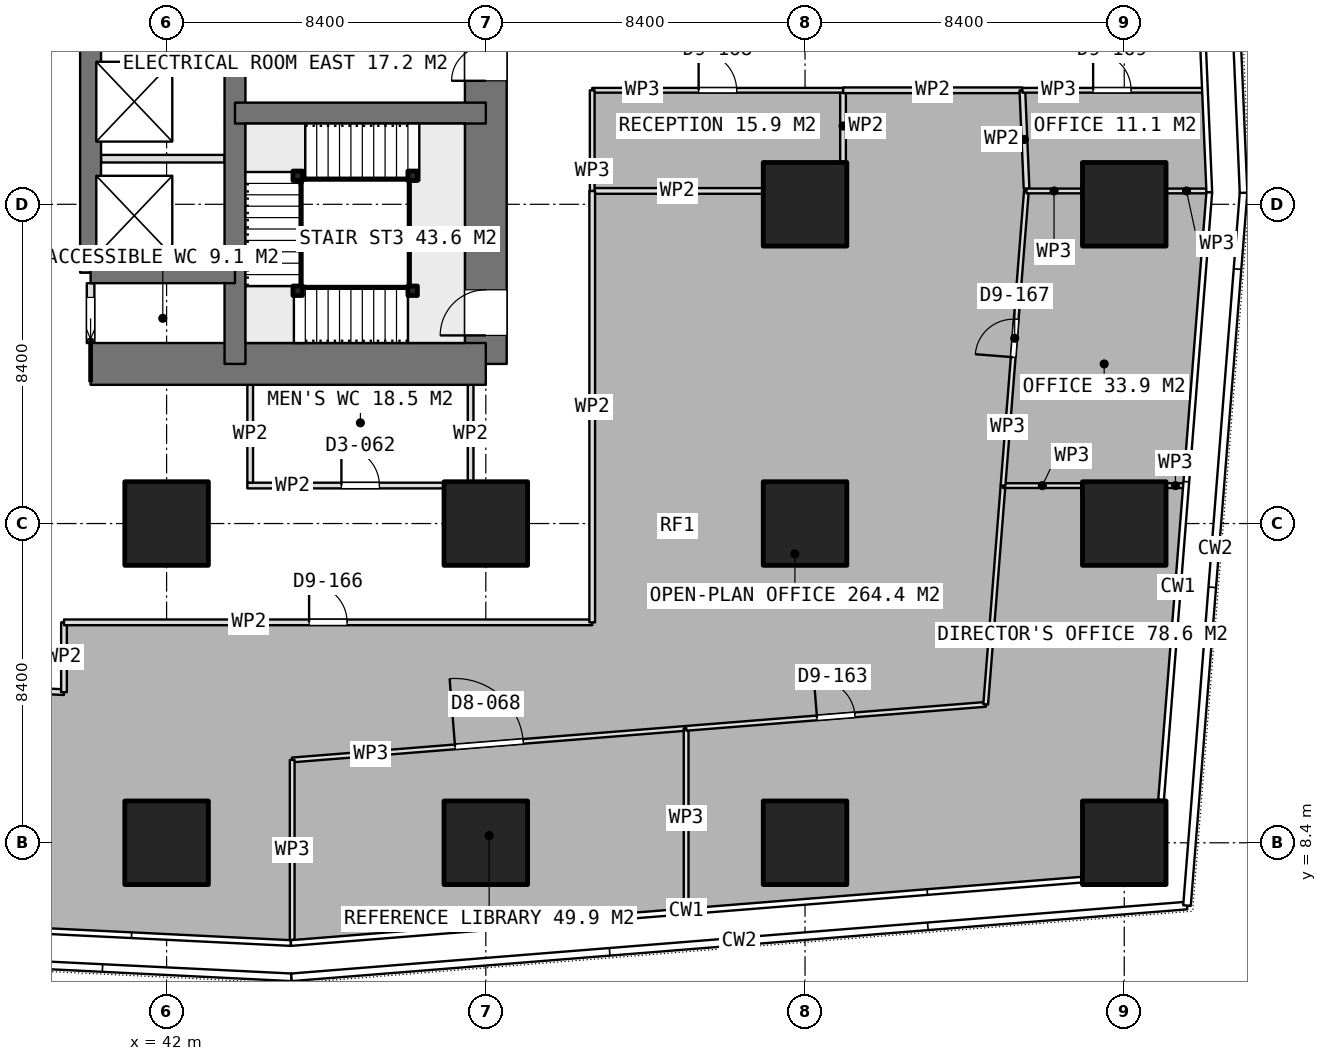
"""IFC4 building model, lengths in metres.
Left out: names, types, materials, properties, quantities, classifications, styles, units other than length and angle.
Written with IfcOpenShell. Run it as: python <this file> out.ifc"""

import sys

from ifc_helpers import new_model, si_unit, direction, frame, frame_2d, origin, origin_2d, place, context, subcontext, project, spatial, rectangle, extrude, element, fill, save


model = new_model("IFC4")
c1 = context("Model", 3, precision=1e-05, world=origin(), true_north=direction((0.0, 1.0)))
c2 = subcontext(c1, "Body", "Model", "MODEL_VIEW")
j1 = project(units=[si_unit("LENGTHUNIT", "METRE"), si_unit("PLANEANGLEUNIT", "RADIAN")], contexts=[c1])
p1 = place(None, origin())
s1 = spatial("IfcSite", under=j1, at=p1, CompositionType="ELEMENT")
p2 = place(p1, origin())
s2 = spatial("IfcBuilding", under=s1, at=p2, CompositionType="ELEMENT")
p3 = place(p2, frame((0.0, 0.0, 55.4)))
s3 = spatial("IfcBuildingStorey", under=s2, at=p3, CompositionType="ELEMENT", Elevation=55.4)
p4 = place(p3, frame((40.0, 21.0, 0.0), z_axis=(0.0, 0.0, 1.0), x_axis=(1.0, 0.0, 0.0)))
e1 = element("IfcWall", 1, at=p4, inside=s3, PredefinedType="SHEAR", context=c2, shape_type="SweptSolid", body=[
    extrude(rectangle(XDim=10.4, YDim=1.1, at=frame_2d((5.2, 0.0))), origin(), (0.0, 0.0, 1.0), 3.75),
])
p5 = place(p3, frame((50.4, 21.0, 0.0), z_axis=(0.0, 0.0, 1.0), x_axis=(0.0, 1.0, 0.0)))
e2 = element("IfcWall", 2, at=p5, inside=s3, PredefinedType="SHEAR", context=c2, shape_type="SweptSolid", body=[
    extrude(rectangle(XDim=25.2, YDim=1.1, at=frame_2d((12.6, 0.0))), origin(), (0.0, 0.0, 1.0), 3.75),
])
p6 = place(p5, frame((16.2, 0.0, 0.0)))
e3 = element("IfcOpeningElement", 3, at=p6, cuts=e2, PredefinedType="OPENING", context=c2, shape_type="SweptSolid", body=[
    extrude(rectangle(XDim=1.2, YDim=2.1, at=frame_2d((0.6, 1.05))), frame((0.0, 0.56, 0.0), z_axis=(0.0, -1.0, 0.0), x_axis=(1.0, 0.0, 0.0)), (0.0, 0.0, 1.0), 1.12),
])
p7 = place(p5, frame((10.05, 0.0, 0.0)))
e4 = element("IfcOpeningElement", 4, at=p7, cuts=e2, PredefinedType="OPENING", context=c2, shape_type="SweptSolid", body=[
    extrude(rectangle(XDim=0.9, YDim=2.1, at=frame_2d((0.45, 1.05))), frame((0.0, 0.56, 0.0), z_axis=(0.0, -1.0, 0.0), x_axis=(1.0, 0.0, 0.0)), (0.0, 0.0, 1.0), 1.12),
])
p8 = place(p5, frame((7.45, 0.0, 0.0)))
e5 = element("IfcOpeningElement", 5, at=p8, cuts=e2, PredefinedType="OPENING", context=c2, shape_type="SweptSolid", body=[
    extrude(rectangle(XDim=0.9, YDim=2.1, at=frame_2d((0.45, 1.05))), frame((0.0, 0.56, 0.0), z_axis=(0.0, -1.0, 0.0), x_axis=(1.0, 0.0, 0.0)), (0.0, 0.0, 1.0), 1.12),
])
p9 = place(p5, frame((0.75, 0.0, 0.0)))
e6 = element("IfcOpeningElement", 6, at=p9, cuts=e2, PredefinedType="OPENING", context=c2, shape_type="SweptSolid", body=[
    extrude(rectangle(XDim=1.2, YDim=2.1, at=frame_2d((0.6, 1.05))), frame((0.0, 0.56, 0.0), z_axis=(0.0, -1.0, 0.0), x_axis=(1.0, 0.0, 0.0)), (0.0, 0.0, 1.0), 1.12),
])
p10 = place(p3, frame((43.8, 21.0, 0.0), z_axis=(0.0, 0.0, 1.0), x_axis=(0.0, 1.0, 0.0)))
e7 = element("IfcWall", 7, at=p10, inside=s3, PredefinedType="SHEAR", context=c2, shape_type="SweptSolid", body=[
    extrude(rectangle(XDim=25.2, YDim=0.55, at=frame_2d((12.6, 0.0))), origin(), (0.0, 0.0, 1.0), 3.75),
])
p11 = place(p3, frame((40.0, 23.4, 0.0), z_axis=(0.0, 0.0, 1.0), x_axis=(0.0, 1.0, 0.0)))
e8 = element("IfcWall", 8, at=p11, inside=s3, PredefinedType="SHEAR", context=c2, shape_type="SweptSolid", body=[
    extrude(rectangle(XDim=18.0, YDim=0.55, at=frame_2d((9.0, 0.0))), origin(), (0.0, 0.0, 1.0), 3.75),
])
p12 = place(p3, frame((40.0, 23.4, 0.0), z_axis=(0.0, 0.0, 1.0), x_axis=(1.0, 0.0, 0.0)))
e9 = element("IfcWall", 9, at=p12, inside=s3, PredefinedType="SHEAR", context=c2, shape_type="SweptSolid", body=[
    extrude(rectangle(XDim=3.8, YDim=0.55, at=frame_2d((1.9, 0.0))), origin(), (0.0, 0.0, 1.0), 3.75),
])
p13 = place(p3, frame((43.8, 27.6, 0.0), z_axis=(0.0, 0.0, 1.0), x_axis=(1.0, 0.0, 0.0)))
e10 = element("IfcWall", 10, at=p13, inside=s3, PredefinedType="SHEAR", context=c2, shape_type="SweptSolid", body=[
    extrude(rectangle(XDim=6.6, YDim=0.55, at=frame_2d((3.3, 0.0))), origin(), (0.0, 0.0, 1.0), 3.75),
])
for number, where, z_axis, x_axis in (
    (11, (42.0, 8.4, 0.0), (0.0, 0.0, 1.0), (1.0, 0.0, 0.0)),
    (12, (42.0, 16.8, 0.0), (0.0, 0.0, 1.0), (1.0, 0.0, 0.0)),
    (13, (50.4, 8.4, 0.0), (0.0, 0.0, 1.0), (1.0, 0.0, 0.0)),
    (14, (50.4, 16.8, 0.0), (0.0, 0.0, 1.0), (1.0, 0.0, 0.0)),
    (15, (58.8, 8.4, 0.0), (0.0, 0.0, 1.0), (1.0, 0.0, 0.0)),
    (16, (58.8, 16.8, 0.0), (0.0, 0.0, 1.0), (1.0, 0.0, 0.0)),
    (17, (58.8, 25.2, 0.0), (0.0, 0.0, 1.0), (1.0, 0.0, 0.0)),
    (18, (67.2, 8.4, 0.0), (0.0, 0.0, 1.0), (1.0, 0.0, 0.0)),
    (19, (67.2, 16.8, 0.0), (0.0, 0.0, 1.0), (1.0, 0.0, 0.0)),
    (20, (67.2, 25.2, 0.0), (0.0, 0.0, 1.0), (1.0, 0.0, 0.0)),
):
    element("IfcColumn", number, at=place(p3, frame(where, z_axis=z_axis, x_axis=x_axis)), inside=s3, PredefinedType="COLUMN", context=c2, shape_type="SweptSolid", body=[
        extrude(rectangle(XDim=2.2, YDim=2.2, at=origin_2d()), origin(), (0.0, 0.0, 1.0), 3.75),
    ])
p14 = place(p3, frame((40.275, 26.4, 0.0), z_axis=(0.0, 0.0, 1.0), x_axis=(1.0, 0.0, 0.0)))
e21 = element("IfcWall", 21, at=p14, inside=s3, PredefinedType="PARTITIONING", context=c2, shape_type="SweptSolid", body=[
    extrude(rectangle(XDim=3.25, YDim=0.2, at=frame_2d((1.625, 0.0))), origin(), (0.0, 0.0, 1.0), 3.5),
])
p15 = place(p3, frame((40.0, 21.55, 0.0), z_axis=(0.0, 0.0, 1.0), x_axis=(0.0, 1.0, 0.0)))
e22 = element("IfcWall", 22, at=p15, inside=s3, PredefinedType="PARTITIONING", context=c2, shape_type="SweptSolid", body=[
    extrude(rectangle(XDim=1.575, YDim=0.2, at=frame_2d((0.788, 0.0))), origin(), (0.0, 0.0, 1.0), 3.5),
])
p16 = place(p15, frame((0.1, 0.0, 0.0)))
e23 = element("IfcOpeningElement", 23, at=p16, cuts=e22, PredefinedType="OPENING", context=c2, shape_type="SweptSolid", body=[
    extrude(rectangle(XDim=1.1, YDim=2.1, at=frame_2d((0.55, 1.05))), frame((0.0, 0.11, 0.0), z_axis=(0.0, -1.0, 0.0), x_axis=(1.0, 0.0, 0.0)), (0.0, 0.0, 1.0), 0.22),
])
p17 = place(p3, frame((44.125, 17.8, 0.0), z_axis=(0.0, 0.0, 1.0), x_axis=(1.0, 0.0, 0.0)))
e24 = element("IfcWall", 24, at=p17, inside=s3, PredefinedType="PARTITIONING", context=c2, shape_type="SweptSolid", body=[
    extrude(rectangle(XDim=5.95, YDim=0.15, at=frame_2d((2.975, 0.0))), origin(), (0.0, 0.0, 1.0), 3.5),
])
p18 = place(p17, frame((2.475, 0.0, 0.0)))
e25 = element("IfcOpeningElement", 25, at=p18, cuts=e24, PredefinedType="OPENING", context=c2, shape_type="SweptSolid", body=[
    extrude(rectangle(XDim=1.0, YDim=2.1, at=frame_2d((0.5, 1.05))), frame((0.0, 0.085, 0.0), z_axis=(0.0, -1.0, 0.0), x_axis=(1.0, 0.0, 0.0)), (0.0, 0.0, 1.0), 0.17),
])
for number, where, z_axis, x_axis in (
    (26, (44.2, 17.875, 0.0), (0.0, 0.0, 1.0), (0.0, 1.0, 0.0)),
    (27, (50.0, 17.875, 0.0), (0.0, 0.0, 1.0), (0.0, 1.0, 0.0)),
):
    element("IfcWall", number, at=place(p3, frame(where, z_axis=z_axis, x_axis=x_axis)), inside=s3, PredefinedType="PARTITIONING", context=c2, shape_type="SweptSolid", body=[
        extrude(rectangle(XDim=2.575, YDim=0.15, at=frame_2d((1.288, 0.0))), origin(), (0.0, 0.0, 1.0), 3.5),
    ])
p19 = place(p3, frame((45.305, 10.58, 0.0), z_axis=(0.0, 0.0, 1.0), x_axis=(0.996803548009, 0.079891718455, 0.0)))
e28 = element("IfcWall", 28, at=p19, inside=s3, PredefinedType="PARTITIONING", context=c2, shape_type="SweptSolid", body=[
    extrude(rectangle(XDim=10.399, YDim=0.125, at=frame_2d((5.2, 0.0))), origin(), (0.0, 0.0, 1.0), 3.5),
])
p20 = place(p19, frame((4.3, 0.0, 0.0)))
e29 = element("IfcOpeningElement", 29, at=p20, cuts=e28, PredefinedType="OPENING", context=c2, shape_type="SweptSolid", body=[
    extrude(rectangle(XDim=1.8, YDim=2.1, at=frame_2d((0.9, 1.05))), frame((0.0, 0.073, 0.0), z_axis=(0.0, -1.0, 0.0), x_axis=(1.0, 0.0, 0.0)), (0.0, 0.0, 1.0), 0.145),
])
p21 = place(p3, frame((55.671, 11.411, 0.0), z_axis=(0.0, 0.0, 1.0), x_axis=(0.0, -1.0, 0.0)))
e30 = element("IfcWall", 30, at=p21, inside=s3, PredefinedType="PARTITIONING", context=c2, shape_type="SweptSolid", body=[
    extrude(rectangle(XDim=4.736, YDim=0.125, at=frame_2d((2.368, 0.0))), origin(), (0.0, 0.0, 1.0), 3.5),
])
p22 = place(p3, frame((45.305, 5.845, 0.0), z_axis=(0.0, 0.0, 1.0), x_axis=(0.0, 1.0, 0.0)))
e31 = element("IfcWall", 31, at=p22, inside=s3, PredefinedType="PARTITIONING", context=c2, shape_type="SweptSolid", body=[
    extrude(rectangle(XDim=4.735, YDim=0.125, at=frame_2d((2.368, 0.0))), origin(), (0.0, 0.0, 1.0), 3.5),
])
p23 = place(p3, frame((55.673, 11.411, 0.0), z_axis=(0.0, 0.0, 1.0), x_axis=(0.996808893134, 0.079824999652, 0.0)))
e32 = element("IfcWall", 32, at=p23, inside=s3, PredefinedType="PARTITIONING", context=c2, shape_type="SweptSolid", body=[
    extrude(rectangle(XDim=7.906, YDim=0.125, at=frame_2d((3.953, 0.0))), origin(), (0.0, 0.0, 1.0), 3.5),
])
p24 = place(p23, frame((3.453, 0.0, 0.0)))
e33 = element("IfcOpeningElement", 33, at=p24, cuts=e32, PredefinedType="OPENING", context=c2, shape_type="SweptSolid", body=[
    extrude(rectangle(XDim=1.0, YDim=2.1, at=frame_2d((0.5, 1.05))), frame((0.0, 0.073, 0.0), z_axis=(0.0, -1.0, 0.0), x_axis=(1.0, 0.0, 0.0)), (0.0, 0.0, 1.0), 0.145),
])
p25 = place(p3, frame((63.554, 12.042, 0.0), z_axis=(0.0, 0.0, 1.0), x_axis=(0.078982245858, 0.996876022803, 0.0)))
e34 = element("IfcWall", 34, at=p25, inside=s3, PredefinedType="PARTITIONING", context=c2, shape_type="SweptSolid", body=[
    extrude(rectangle(XDim=5.774, YDim=0.125, at=frame_2d((2.887, 0.0))), origin(), (0.0, 0.0, 1.0), 3.5),
])
p26 = place(p3, frame((64.01, 17.798, 0.0), z_axis=(0.0, 0.0, 1.0), x_axis=(1.0, 0.0, 0.0)))
e35 = element("IfcWall", 35, at=p26, inside=s3, PredefinedType="PARTITIONING", context=c2, shape_type="SweptSolid", body=[
    extrude(rectangle(XDim=2.07, YDim=0.125, at=frame_2d((1.035, 0.0))), origin(), (0.0, 0.0, 1.0), 3.5),
])
p27 = place(p3, frame((68.32, 17.798, 0.0), z_axis=(0.0, 0.0, 1.0), x_axis=(1.0, 0.0, 0.0)))
e36 = element("IfcWall", 36, at=p27, inside=s3, PredefinedType="PARTITIONING", context=c2, shape_type="SweptSolid", body=[
    extrude(rectangle(XDim=0.455, YDim=0.125, at=frame_2d((0.228, 0.0))), origin(), (0.0, 0.0, 1.0), 3.5),
])
p28 = place(p3, frame((64.01, 17.799, 0.0), z_axis=(0.0, 0.0, 1.0), x_axis=(0.07908510204, 0.996867868193, 0.0)))
e37 = element("IfcWall", 37, at=p28, inside=s3, PredefinedType="PARTITIONING", context=c2, shape_type="SweptSolid", body=[
    extrude(rectangle(XDim=7.776, YDim=0.125, at=frame_2d((3.888, 0.0))), origin(), (0.0, 0.0, 1.0), 3.5),
])
p29 = place(p28, frame((3.388, 0.0, 0.0)))
e38 = element("IfcOpeningElement", 38, at=p29, cuts=e37, PredefinedType="OPENING", context=c2, shape_type="SweptSolid", body=[
    extrude(rectangle(XDim=1.0, YDim=2.1, at=frame_2d((0.5, 1.05))), frame((0.0, 0.073, 0.0), z_axis=(0.0, -1.0, 0.0), x_axis=(1.0, 0.0, 0.0)), (0.0, 0.0, 1.0), 0.145),
])
p30 = place(p3, frame((64.625, 25.551, 0.0), z_axis=(0.0, 0.0, 1.0), x_axis=(1.0, 0.0, 0.0)))
e39 = element("IfcWall", 39, at=p30, inside=s3, PredefinedType="PARTITIONING", context=c2, shape_type="SweptSolid", body=[
    extrude(rectangle(XDim=1.455, YDim=0.125, at=frame_2d((0.728, 0.0))), origin(), (0.0, 0.0, 1.0), 3.5),
])
p31 = place(p3, frame((68.32, 25.551, 0.0), z_axis=(0.0, 0.0, 1.0), x_axis=(1.0, 0.0, 0.0)))
e40 = element("IfcWall", 40, at=p31, inside=s3, PredefinedType="PARTITIONING", context=c2, shape_type="SweptSolid", body=[
    extrude(rectangle(XDim=1.037, YDim=0.125, at=frame_2d((0.519, 0.0))), origin(), (0.0, 0.0, 1.0), 3.5),
])
p32 = place(p3, frame((53.2, 25.552, 0.0), z_axis=(0.0, 0.0, 1.0), x_axis=(1.0, 0.0, 0.0)))
e41 = element("IfcWall", 41, at=p32, inside=s3, PredefinedType="PARTITIONING", context=c2, shape_type="SweptSolid", body=[
    extrude(rectangle(XDim=4.48, YDim=0.15, at=frame_2d((2.24, 0.0))), origin(), (0.0, 0.0, 1.0), 3.5),
])
p33 = place(p3, frame((59.8, 26.32, 0.0), z_axis=(0.0, 0.0, 1.0), x_axis=(0.0, 1.0, 0.0)))
e42 = element("IfcWall", 42, at=p33, inside=s3, PredefinedType="PARTITIONING", context=c2, shape_type="SweptSolid", body=[
    extrude(rectangle(XDim=1.88, YDim=0.15, at=frame_2d((0.94, 0.0))), origin(), (0.0, 0.0, 1.0), 3.5),
])
p34 = place(p3, frame((59.8, 28.2, 0.0), z_axis=(0.0, 0.0, 1.0), x_axis=(1.0, 0.0, 0.0)))
e43 = element("IfcWall", 43, at=p34, inside=s3, PredefinedType="PARTITIONING", context=c2, shape_type="SweptSolid", body=[
    extrude(rectangle(XDim=4.719, YDim=0.15, at=frame_2d((2.359, 0.0))), origin(), (0.0, 0.0, 1.0), 3.5),
])
p35 = place(p3, frame((64.519, 28.2, 0.0), z_axis=(0.0, 0.0, 1.0), x_axis=(0.042430609407, -0.999099416167, 0.0)))
e44 = element("IfcWall", 44, at=p35, inside=s3, PredefinedType="PARTITIONING", context=c2, shape_type="SweptSolid", body=[
    extrude(rectangle(XDim=2.589, YDim=0.15, at=frame_2d((1.295, 0.0))), origin(), (0.0, 0.0, 1.0), 3.5),
])
p36 = place(p3, frame((36.3, 12.51, 0.0), z_axis=(0.0, 0.0, 1.0), x_axis=(0.998802102454, -0.048932199355, 0.0)))
e45 = element("IfcWall", 45, at=p36, inside=s3, PredefinedType="PARTITIONING", context=c2, shape_type="SweptSolid", body=[
    extrude(rectangle(XDim=3.004, YDim=0.15, at=frame_2d((1.502, 0.0))), origin(), (0.0, 0.0, 1.0), 3.5),
])
p37 = place(p3, frame((39.3, 12.363, 0.0), z_axis=(0.0, 0.0, 1.0), x_axis=(0.0, 1.0, 0.0)))
e46 = element("IfcWall", 46, at=p37, inside=s3, PredefinedType="PARTITIONING", context=c2, shape_type="SweptSolid", body=[
    extrude(rectangle(XDim=1.837, YDim=0.15, at=frame_2d((0.918, 0.0))), origin(), (0.0, 0.0, 1.0), 3.5),
])
p38 = place(p3, frame((39.3, 14.2, 0.0), z_axis=(0.0, 0.0, 1.0), x_axis=(1.0, 0.0, 0.0)))
e47 = element("IfcWall", 47, at=p38, inside=s3, PredefinedType="PARTITIONING", context=c2, shape_type="SweptSolid", body=[
    extrude(rectangle(XDim=13.9, YDim=0.15, at=frame_2d((6.95, 0.0))), origin(), (0.0, 0.0, 1.0), 3.5),
])
p39 = place(p38, frame((6.45, 0.0, 0.0)))
e48 = element("IfcOpeningElement", 48, at=p39, cuts=e47, PredefinedType="OPENING", context=c2, shape_type="SweptSolid", body=[
    extrude(rectangle(XDim=1.0, YDim=2.1, at=frame_2d((0.5, 1.05))), frame((0.0, 0.085, 0.0), z_axis=(0.0, -1.0, 0.0), x_axis=(1.0, 0.0, 0.0)), (0.0, 0.0, 1.0), 0.17),
])
p40 = place(p3, frame((53.2, 14.2, 0.0), z_axis=(0.0, 0.0, 1.0), x_axis=(0.0, 1.0, 0.0)))
e49 = element("IfcWall", 49, at=p40, inside=s3, PredefinedType="PARTITIONING", context=c2, shape_type="SweptSolid", body=[
    extrude(rectangle(XDim=11.352, YDim=0.15, at=frame_2d((5.676, 0.0))), origin(), (0.0, 0.0, 1.0), 3.5),
])
p41 = place(p3, frame((64.519, 28.2, 0.0), z_axis=(0.0, 0.0, 1.0), x_axis=(1.0, 0.0, 0.0)))
e50 = element("IfcWall", 50, at=p41, inside=s3, PredefinedType="PARTITIONING", context=c2, shape_type="SweptSolid", body=[
    extrude(rectangle(XDim=4.755, YDim=0.125, at=frame_2d((2.377, 0.0))), origin(), (0.0, 0.0, 1.0), 3.5),
])
p42 = place(p41, frame((1.862, 0.0, 0.0)))
e51 = element("IfcOpeningElement", 51, at=p42, cuts=e50, PredefinedType="OPENING", context=c2, shape_type="SweptSolid", body=[
    extrude(rectangle(XDim=1.0, YDim=2.1, at=frame_2d((0.5, 1.05))), frame((0.0, 0.073, 0.0), z_axis=(0.0, -1.0, 0.0), x_axis=(1.0, 0.0, 0.0)), (0.0, 0.0, 1.0), 0.145),
])
p43 = place(p3, frame((53.2, 28.2, 0.0), z_axis=(0.0, 0.0, 1.0), x_axis=(1.0, 0.0, 0.0)))
e52 = element("IfcWall", 52, at=p43, inside=s3, PredefinedType="PARTITIONING", context=c2, shape_type="SweptSolid", body=[
    extrude(rectangle(XDim=6.6, YDim=0.125, at=frame_2d((3.3, 0.0))), origin(), (0.0, 0.0, 1.0), 3.5),
])
p44 = place(p43, frame((2.8, 0.0, 0.0)))
e53 = element("IfcOpeningElement", 53, at=p44, cuts=e52, PredefinedType="OPENING", context=c2, shape_type="SweptSolid", body=[
    extrude(rectangle(XDim=1.0, YDim=2.1, at=frame_2d((0.5, 1.05))), frame((0.0, 0.073, 0.0), z_axis=(0.0, -1.0, 0.0), x_axis=(1.0, 0.0, 0.0)), (0.0, 0.0, 1.0), 0.145),
])
p45 = place(p3, frame((53.2, 25.552, 0.0), z_axis=(0.0, 0.0, 1.0), x_axis=(0.0, 1.0, 0.0)))
e54 = element("IfcWall", 54, at=p45, inside=s3, PredefinedType="PARTITIONING", context=c2, shape_type="SweptSolid", body=[
    extrude(rectangle(XDim=2.648, YDim=0.125, at=frame_2d((1.324, 0.0))), origin(), (0.0, 0.0, 1.0), 3.5),
])
for number, where, z_axis, x_axis in (
    (55, (48.475, 22.925, 0.0), (0.0, 0.0, 1.0), (1.0, 0.0, 0.0)),
    (56, (45.45, 22.925, 0.0), (0.0, 0.0, 1.0), (1.0, 0.0, 0.0)),
    (57, (45.45, 25.95, 0.0), (0.0, 0.0, 1.0), (1.0, 0.0, 0.0)),
    (58, (48.475, 25.95, 0.0), (0.0, 0.0, 1.0), (1.0, 0.0, 0.0)),
):
    element("IfcColumn", number, at=place(p3, frame(where, z_axis=z_axis, x_axis=x_axis)), inside=s3, PredefinedType="COLUMN", context=c2, shape_type="SweptSolid", body=[
        extrude(rectangle(XDim=0.25, YDim=0.25, at=origin_2d()), origin(), (0.0, 0.0, 1.0), 3.75),
    ])
p46 = place(p8, origin())
e59 = element("IfcDoor", 59, at=p46, inside=s3, OperationType="SINGLE_SWING_LEFT", PredefinedType="DOOR", context=c2, shape_type="SweptSolid", body=[
    extrude(rectangle(XDim=0.9, YDim=2.1, at=frame_2d((0.45, 1.05))), frame((0.0, 0.025, 0.0), z_axis=(0.0, -1.0, 0.0), x_axis=(1.0, 0.0, 0.0)), (0.0, 0.0, 1.0), 0.05),
])
fill(e5, e59)
p47 = place(p16, origin())
e60 = element("IfcDoor", 60, at=p47, inside=s3, OperationType="SLIDING_TO_LEFT", PredefinedType="DOOR", context=c2, shape_type="SweptSolid", body=[
    extrude(rectangle(XDim=1.1, YDim=2.1, at=frame_2d((0.55, 1.05))), frame((0.0, 0.025, 0.0), z_axis=(0.0, -1.0, 0.0), x_axis=(1.0, 0.0, 0.0)), (0.0, 0.0, 1.0), 0.05),
])
fill(e23, e60)
p48 = place(p18, origin())
e61 = element("IfcDoor", 61, at=p48, inside=s3, OperationType="SINGLE_SWING_LEFT", PredefinedType="DOOR", context=c2, shape_type="SweptSolid", body=[
    extrude(rectangle(XDim=1.0, YDim=2.1, at=frame_2d((0.5, 1.05))), frame((0.0, 0.025, 0.0), z_axis=(0.0, -1.0, 0.0), x_axis=(1.0, 0.0, 0.0)), (0.0, 0.0, 1.0), 0.05),
])
fill(e25, e61)
p49 = place(p20, origin())
e62 = element("IfcDoor", 62, at=p49, inside=s3, OperationType="DOUBLE_DOOR_SINGLE_SWING", PredefinedType="DOOR", context=c2, shape_type="SweptSolid", body=[
    extrude(rectangle(XDim=1.8, YDim=2.1, at=frame_2d((0.9, 1.05))), frame((0.0, 0.025, 0.0), z_axis=(0.0, -1.0, 0.0), x_axis=(1.0, 0.0, 0.0)), (0.0, 0.0, 1.0), 0.05),
])
fill(e29, e62)
p50 = place(p24, origin())
e63 = element("IfcDoor", 63, at=p50, inside=s3, OperationType="SINGLE_SWING_LEFT", PredefinedType="DOOR", context=c2, shape_type="SweptSolid", body=[
    extrude(rectangle(XDim=1.0, YDim=2.1, at=frame_2d((0.5, 1.05))), frame((0.0, 0.025, 0.0), z_axis=(0.0, -1.0, 0.0), x_axis=(1.0, 0.0, 0.0)), (0.0, 0.0, 1.0), 0.05),
])
fill(e33, e63)
p51 = place(p29, origin())
e64 = element("IfcDoor", 64, at=p51, inside=s3, OperationType="SINGLE_SWING_LEFT", PredefinedType="DOOR", context=c2, shape_type="SweptSolid", body=[
    extrude(rectangle(XDim=1.0, YDim=2.1, at=frame_2d((0.5, 1.05))), frame((0.0, 0.025, 0.0), z_axis=(0.0, -1.0, 0.0), x_axis=(1.0, 0.0, 0.0)), (0.0, 0.0, 1.0), 0.05),
])
fill(e38, e64)
p52 = place(p39, origin())
e65 = element("IfcDoor", 65, at=p52, inside=s3, OperationType="SINGLE_SWING_LEFT", PredefinedType="DOOR", context=c2, shape_type="SweptSolid", body=[
    extrude(rectangle(XDim=1.0, YDim=2.1, at=frame_2d((0.5, 1.05))), frame((0.0, 0.025, 0.0), z_axis=(0.0, -1.0, 0.0), x_axis=(1.0, 0.0, 0.0)), (0.0, 0.0, 1.0), 0.05),
])
fill(e48, e65)
p53 = place(p42, origin())
e66 = element("IfcDoor", 66, at=p53, inside=s3, OperationType="SINGLE_SWING_LEFT", PredefinedType="DOOR", context=c2, shape_type="SweptSolid", body=[
    extrude(rectangle(XDim=1.0, YDim=2.1, at=frame_2d((0.5, 1.05))), frame((0.0, 0.025, 0.0), z_axis=(0.0, -1.0, 0.0), x_axis=(1.0, 0.0, 0.0)), (0.0, 0.0, 1.0), 0.05),
])
fill(e51, e66)
p54 = place(p44, origin())
e67 = element("IfcDoor", 67, at=p54, inside=s3, OperationType="SINGLE_SWING_LEFT", PredefinedType="DOOR", context=c2, shape_type="SweptSolid", body=[
    extrude(rectangle(XDim=1.0, YDim=2.1, at=frame_2d((0.5, 1.05))), frame((0.0, 0.025, 0.0), z_axis=(0.0, -1.0, 0.0), x_axis=(1.0, 0.0, 0.0)), (0.0, 0.0, 1.0), 0.05),
])
fill(e53, e67)
p55 = place(p9, origin())
e68 = element("IfcDoor", 68, at=p55, inside=s3, OperationType="SINGLE_SWING_RIGHT", PredefinedType="DOOR", context=c2, shape_type="SweptSolid", body=[
    extrude(rectangle(XDim=1.2, YDim=2.1, at=frame_2d((0.6, 1.05))), frame((0.0, 0.025, 0.0), z_axis=(0.0, -1.0, 0.0), x_axis=(1.0, 0.0, 0.0)), (0.0, 0.0, 1.0), 0.05),
])
fill(e6, e68)
save(model, sys.argv[1])
